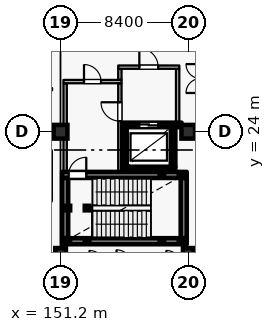
"""IFC4 building model, lengths in metres.
Left out: names, types, materials, properties, quantities, classifications, styles, units other than length and angle.
Written with IfcOpenShell. Run it as: python <this file> out.ifc"""

import sys

from ifc_helpers import new_model, si_unit, direction, frame, frame_2d, origin, origin_2d, place, context, subcontext, project, spatial, rectangle, hollow_rectangle, extrude, element, fill, save


model = new_model("IFC4")
c1 = context("Model", 3, precision=1e-05, world=origin(), true_north=direction((0.0, 1.0)))
c2 = subcontext(c1, "Body", "Model", "MODEL_VIEW")
j1 = project(units=[si_unit("LENGTHUNIT", "METRE"), si_unit("PLANEANGLEUNIT", "RADIAN")], contexts=[c1])
p1 = place(None, origin())
s1 = spatial("IfcSite", under=j1, at=p1, CompositionType="ELEMENT")
p2 = place(p1, origin())
s2 = spatial("IfcBuilding", under=s1, at=p2, CompositionType="ELEMENT")
p3 = place(p2, frame((0.0, 0.0, 16.2)))
s3 = spatial("IfcBuildingStorey", under=s2, at=p3, CompositionType="ELEMENT", Elevation=16.2)
for number, where, z_axis, x_axis in (
    (1, (151.2, 24.0, 0.0), (0.0, 0.0, 1.0), (1.0, 0.0, 0.0)),
    (2, (159.6, 24.0, 0.0), (0.0, 0.0, 1.0), (1.0, 0.0, 0.0)),
):
    element("IfcColumn", number, at=place(p3, frame(where, z_axis=z_axis, x_axis=x_axis)), inside=s3, PredefinedType="COLUMN", context=c2, shape_type="SweptSolid", body=[
        extrude(rectangle(XDim=0.9, YDim=0.9, at=origin_2d()), origin(), (0.0, 0.0, 1.0), 4.8),
    ])
for number, where, z_axis, x_axis in (
    (3, (151.2, 16.0, 0.0), (0.0, 0.0, 1.0), (1.0, 0.0, 0.0)),
    (4, (159.6, 16.0, 0.0), (0.0, 0.0, 1.0), (1.0, 0.0, 0.0)),
):
    element("IfcColumn", number, at=place(p3, frame(where, z_axis=z_axis, x_axis=x_axis)), inside=s3, PredefinedType="COLUMN", context=c2, shape_type="SweptSolid", body=[
        extrude(rectangle(XDim=0.7, YDim=0.7, at=origin_2d()), origin(), (0.0, 0.0, 1.0), 4.8),
    ])
p4 = place(p3, frame((155.25, 21.55, 0.0), z_axis=(0.0, 0.0, 1.0), x_axis=(1.0, 0.0, 0.0)))
e5 = element("IfcWall", 5, at=p4, inside=s3, PredefinedType="SHEAR", context=c2, shape_type="SweptSolid", body=[
    extrude(rectangle(XDim=3.5, YDim=0.3, at=frame_2d((1.75, 0.0))), origin(), (0.0, 0.0, 1.0), 4.535),
])
p5 = place(p3, frame((158.6, 21.705, 0.0), z_axis=(0.0, 0.0, 1.0), x_axis=(0.0, 1.0, 0.0)))
e6 = element("IfcWall", 6, at=p5, inside=s3, PredefinedType="SHEAR", context=c2, shape_type="SweptSolid", body=[
    extrude(rectangle(XDim=2.59, YDim=0.3, at=frame_2d((1.295, 0.0))), origin(), (0.0, 0.0, 1.0), 4.535),
])
p6 = place(p3, frame((159.16, 24.45, 0.0), z_axis=(0.0, 0.0, 1.0), x_axis=(-1.0, 0.0, 0.0)))
e7 = element("IfcWall", 7, at=p6, inside=s3, PredefinedType="SHEAR", context=c2, shape_type="SweptSolid", body=[
    extrude(rectangle(XDim=3.91, YDim=0.3, at=frame_2d((1.955, 0.0))), origin(), (0.0, 0.0, 1.0), 4.535),
])
p7 = place(p6, frame((1.535, 0.0, 0.0)))
e8 = element("IfcOpeningElement", 8, at=p7, cuts=e7, PredefinedType="OPENING", context=c2, shape_type="SweptSolid", body=[
    extrude(rectangle(XDim=1.25, YDim=2.25, at=frame_2d((0.625, 1.125))), frame((0.0, 0.16, 0.0), z_axis=(0.0, -1.0, 0.0), x_axis=(1.0, 0.0, 0.0)), (0.0, 0.0, 1.0), 0.32),
])
p8 = place(p3, frame((155.4, 24.295, 0.0), z_axis=(0.0, 0.0, 1.0), x_axis=(0.0, -1.0, 0.0)))
e9 = element("IfcWall", 9, at=p8, inside=s3, PredefinedType="SHEAR", context=c2, shape_type="SweptSolid", body=[
    extrude(rectangle(XDim=2.59, YDim=0.3, at=frame_2d((1.295, 0.0))), origin(), (0.0, 0.0, 1.0), 4.535),
])
p9 = place(p3, frame((151.3, 16.8, 0.0), z_axis=(0.0, 0.0, 1.0), x_axis=(1.0, 0.0, 0.0)))
e10 = element("IfcWall", 10, at=p9, inside=s3, PredefinedType="SHEAR", context=c2, shape_type="SweptSolid", body=[
    extrude(rectangle(XDim=8.2, YDim=0.4, at=frame_2d((4.1, 0.0))), origin(), (0.0, 0.0, 1.0), 4.535),
])
p10 = place(p3, frame((159.3, 17.005, 0.0), z_axis=(0.0, 0.0, 1.0), x_axis=(0.0, 1.0, 0.0)))
e11 = element("IfcWall", 11, at=p10, inside=s3, PredefinedType="SHEAR", context=c2, shape_type="SweptSolid", body=[
    extrude(rectangle(XDim=3.95, YDim=0.4, at=frame_2d((1.975, 0.0))), origin(), (0.0, 0.0, 1.0), 4.535),
])
p11 = place(p3, frame((151.3, 21.16, 0.0), z_axis=(0.0, 0.0, 1.0), x_axis=(1.0, 0.0, 0.0)))
e12 = element("IfcWall", 12, at=p11, inside=s3, PredefinedType="SHEAR", context=c2, shape_type="SweptSolid", body=[
    extrude(rectangle(XDim=8.2, YDim=0.4, at=frame_2d((4.1, 0.0))), origin(), (0.0, 0.0, 1.0), 4.535),
])
p12 = place(p11, frame((0.43, 0.0, 0.0)))
e13 = element("IfcOpeningElement", 13, at=p12, cuts=e12, PredefinedType="OPENING", context=c2, shape_type="SweptSolid", body=[
    extrude(rectangle(XDim=1.16, YDim=2.2, at=frame_2d((0.58, 1.1))), frame((0.0, 0.21, 0.0), z_axis=(0.0, -1.0, 0.0), x_axis=(1.0, 0.0, 0.0)), (0.0, 0.0, 1.0), 0.42),
])
p13 = place(p3, frame((151.5, 17.005, 0.0), z_axis=(0.0, 0.0, 1.0), x_axis=(0.0, 1.0, 0.0)))
e14 = element("IfcWall", 14, at=p13, inside=s3, PredefinedType="SHEAR", context=c2, shape_type="SweptSolid", body=[
    extrude(rectangle(XDim=3.95, YDim=0.4, at=frame_2d((1.975, 0.0))), origin(), (0.0, 0.0, 1.0), 4.535),
])
p14 = place(p3, frame((151.5, 21.365, 0.0), z_axis=(0.0, 0.0, 1.0), x_axis=(0.0, 1.0, 0.0)))
e15 = element("IfcWall", 15, at=p14, inside=s3, PredefinedType="PARTITIONING", context=c2, shape_type="SweptSolid", body=[
    extrude(rectangle(XDim=5.82, YDim=0.22, at=frame_2d((2.91, 0.0))), origin(), (0.0, 0.0, 1.0), 4.535),
])
p15 = place(p3, frame((151.39, 27.3, 0.0), z_axis=(0.0, 0.0, 1.0), x_axis=(1.0, 0.0, 0.0)))
e16 = element("IfcWall", 16, at=p15, inside=s3, PredefinedType="PARTITIONING", context=c2, shape_type="SweptSolid", body=[
    extrude(rectangle(XDim=3.82, YDim=0.22, at=frame_2d((1.91, 0.0))), origin(), (0.0, 0.0, 1.0), 4.535),
])
p16 = place(p15, frame((1.35, 0.0, 0.0)))
e17 = element("IfcOpeningElement", 17, at=p16, cuts=e16, PredefinedType="OPENING", context=c2, shape_type="SweptSolid", body=[
    extrude(rectangle(XDim=1.12, YDim=2.2, at=frame_2d((0.56, 1.1))), frame((0.0, 0.12, 0.0), z_axis=(0.0, -1.0, 0.0), x_axis=(1.0, 0.0, 0.0)), (0.0, 0.0, 1.0), 0.24),
])
p17 = place(p3, frame((155.1, 21.365, 0.0), z_axis=(0.0, 0.0, 1.0), x_axis=(0.0, 1.0, 0.0)))
e18 = element("IfcWall", 18, at=p17, inside=s3, PredefinedType="PARTITIONING", context=c2, shape_type="SweptSolid", body=[
    extrude(rectangle(XDim=5.82, YDim=0.22, at=frame_2d((2.91, 0.0))), origin(), (0.0, 0.0, 1.0), 4.535),
])
p18 = place(p17, frame((3.335, 0.0, 0.0)))
e19 = element("IfcOpeningElement", 19, at=p18, cuts=e18, PredefinedType="OPENING", context=c2, shape_type="SweptSolid", body=[
    extrude(rectangle(XDim=1.24, YDim=2.2, at=frame_2d((0.62, 1.1))), frame((0.0, 0.12, 0.0), z_axis=(0.0, -1.0, 0.0), x_axis=(1.0, 0.0, 0.0)), (0.0, 0.0, 1.0), 0.24),
])
p19 = place(p3, frame((155.1, 27.415, 0.0), z_axis=(0.0, 0.0, 1.0), x_axis=(0.0, 1.0, 0.0)))
e20 = element("IfcWall", 20, at=p19, inside=s3, PredefinedType="PARTITIONING", context=c2, shape_type="SweptSolid", body=[
    extrude(rectangle(XDim=0.72, YDim=0.22, at=frame_2d((0.36, 0.0))), origin(), (0.0, 0.0, 1.0), 4.535),
])
p20 = place(p3, frame((158.9, 24.605, 0.0), z_axis=(0.0, 0.0, 1.0), x_axis=(0.0, 1.0, 0.0)))
e21 = element("IfcWall", 21, at=p20, inside=s3, PredefinedType="PARTITIONING", context=c2, shape_type="SweptSolid", body=[
    extrude(rectangle(XDim=3.53, YDim=0.22, at=frame_2d((1.765, 0.0))), origin(), (0.0, 0.0, 1.0), 4.535),
])
p21 = place(p3, frame((154.99, 28.25, 0.0), z_axis=(0.0, 0.0, 1.0), x_axis=(1.0, 0.0, 0.0)))
e22 = element("IfcWall", 22, at=p21, inside=s3, PredefinedType="PARTITIONING", context=c2, shape_type="SweptSolid", body=[
    extrude(rectangle(XDim=4.02, YDim=0.22, at=frame_2d((2.01, 0.0))), origin(), (0.0, 0.0, 1.0), 4.535),
])
p22 = place(p21, frame((1.39, 0.0, 0.0)))
e23 = element("IfcOpeningElement", 23, at=p22, cuts=e22, PredefinedType="OPENING", context=c2, shape_type="SweptSolid", body=[
    extrude(rectangle(XDim=1.24, YDim=2.2, at=frame_2d((0.62, 1.1))), frame((0.0, 0.12, 0.0), z_axis=(0.0, -1.0, 0.0), x_axis=(1.0, 0.0, 0.0)), (0.0, 0.0, 1.0), 0.24),
])
for number, where, z_axis, x_axis in (
    (24, (151.68, 16.8, 0.0), (0.0, 0.0, 1.0), (1.0, 0.0, 0.0)),
    (25, (151.68, 18.98, 0.0), (0.0, 0.0, 1.0), (1.0, 0.0, 0.0)),
    (26, (152.94, 16.8, 0.0), (0.0, 0.0, 1.0), (1.0, 0.0, 0.0)),
    (27, (152.94, 18.98, 0.0), (0.0, 0.0, 1.0), (1.0, 0.0, 0.0)),
):
    element("IfcColumn", number, at=place(p3, frame(where, z_axis=z_axis, x_axis=x_axis)), inside=s3, PredefinedType="COLUMN", context=c2, shape_type="SweptSolid", body=[
        extrude(hollow_rectangle(XDim=0.3, YDim=0.3, WallThickness=0.012, at=origin_2d()), origin(), (0.0, 0.0, 1.0), 4.62),
    ])
for number, where, z_axis, x_axis in (
    (28, (157.86, 16.8, -2.4), (0.0, 0.0, 1.0), (1.0, 0.0, 0.0)),
    (29, (157.86, 21.16, -2.4), (0.0, 0.0, 1.0), (1.0, 0.0, 0.0)),
    (30, (159.12, 16.8, -2.4), (0.0, 0.0, 1.0), (1.0, 0.0, 0.0)),
    (31, (159.12, 21.16, -2.4), (0.0, 0.0, 1.0), (1.0, 0.0, 0.0)),
):
    element("IfcColumn", number, at=place(p3, frame(where, z_axis=z_axis, x_axis=x_axis)), inside=s3, PredefinedType="COLUMN", context=c2, shape_type="SweptSolid", body=[
        extrude(hollow_rectangle(XDim=0.3, YDim=0.3, WallThickness=0.012, at=origin_2d()), origin(), (0.0, 0.0, 1.0), 4.62),
    ])
p23 = place(p7, origin())
e32 = element("IfcDoor", 32, at=p23, inside=s3, OperationType="DOUBLE_DOOR_SLIDING", PredefinedType="DOOR", context=c2, shape_type="SweptSolid", body=[
    extrude(rectangle(XDim=1.25, YDim=2.25, at=frame_2d((0.625, 1.125))), frame((0.0, 0.025, 0.0), z_axis=(0.0, -1.0, 0.0), x_axis=(1.0, 0.0, 0.0)), (0.0, 0.0, 1.0), 0.05),
])
fill(e8, e32)
p24 = place(p12, origin())
e33 = element("IfcDoor", 33, at=p24, inside=s3, OperationType="SINGLE_SWING_RIGHT", PredefinedType="DOOR", context=c2, shape_type="SweptSolid", body=[
    extrude(rectangle(XDim=1.16, YDim=2.2, at=frame_2d((0.58, 1.1))), frame((0.0, 0.025, 0.0), z_axis=(0.0, -1.0, 0.0), x_axis=(1.0, 0.0, 0.0)), (0.0, 0.0, 1.0), 0.05),
])
fill(e13, e33)
p25 = place(p16, origin())
e34 = element("IfcDoor", 34, at=p25, inside=s3, OperationType="SINGLE_SWING_LEFT", PredefinedType="DOOR", context=c2, shape_type="SweptSolid", body=[
    extrude(rectangle(XDim=1.12, YDim=2.2, at=frame_2d((0.56, 1.1))), frame((0.0, 0.025, 0.0), z_axis=(0.0, -1.0, 0.0), x_axis=(1.0, 0.0, 0.0)), (0.0, 0.0, 1.0), 0.05),
])
fill(e17, e34)
p26 = place(p18, origin())
e35 = element("IfcDoor", 35, at=p26, inside=s3, OperationType="SINGLE_SWING_RIGHT", PredefinedType="DOOR", context=c2, shape_type="SweptSolid", body=[
    extrude(rectangle(XDim=1.24, YDim=2.2, at=frame_2d((0.62, 1.1))), frame((0.0, 0.025, 0.0), z_axis=(0.0, -1.0, 0.0), x_axis=(1.0, 0.0, 0.0)), (0.0, 0.0, 1.0), 0.05),
])
fill(e19, e35)
p27 = place(p22, origin())
e36 = element("IfcDoor", 36, at=p27, inside=s3, OperationType="SINGLE_SWING_LEFT", PredefinedType="DOOR", context=c2, shape_type="SweptSolid", body=[
    extrude(rectangle(XDim=1.24, YDim=2.2, at=frame_2d((0.62, 1.1))), frame((0.0, 0.025, 0.0), z_axis=(0.0, -1.0, 0.0), x_axis=(1.0, 0.0, 0.0)), (0.0, 0.0, 1.0), 0.05),
])
fill(e23, e36)
save(model, sys.argv[1])
